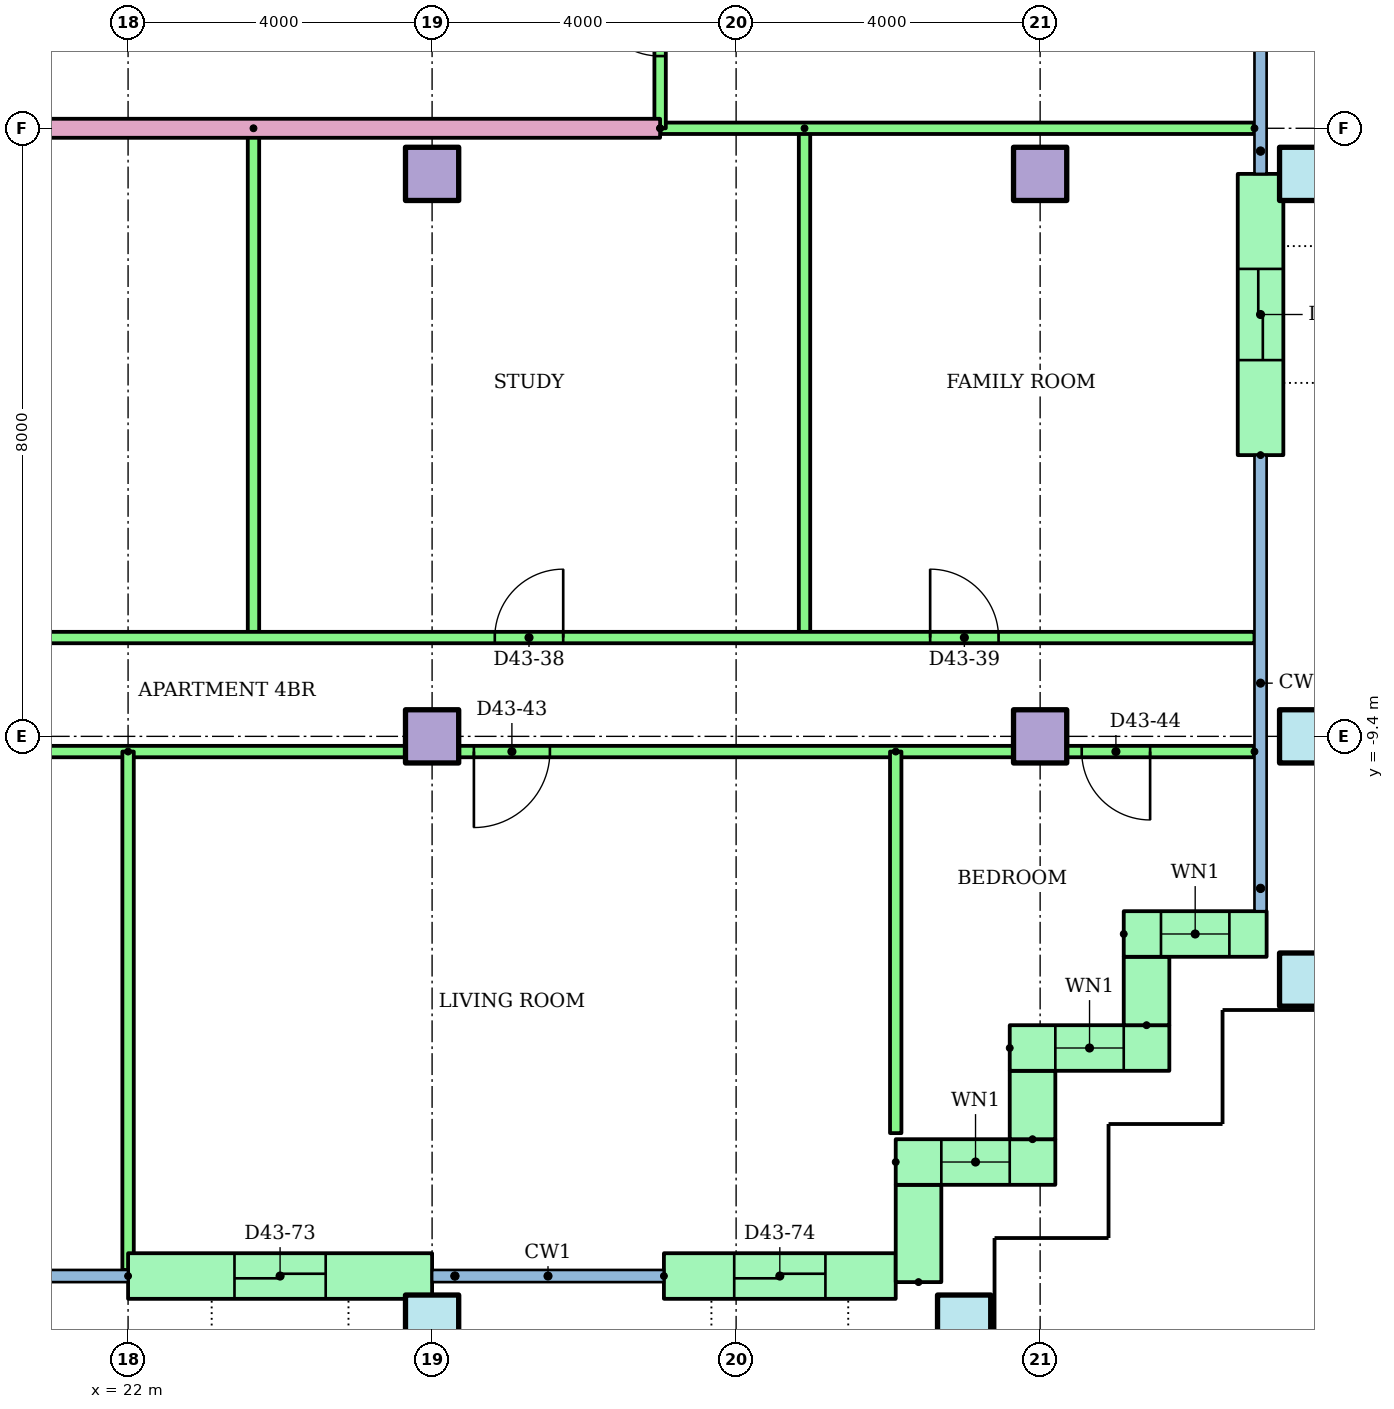
"""IFC4 building model, lengths in metres.
Left out: names, types, materials, properties, quantities, classifications, styles, units other than length and angle.
Written with IfcOpenShell. Run it as: python <this file> out.ifc"""

import sys

from ifc_helpers import new_model, si_unit, direction, frame, frame_2d, origin, origin_2d, place, context, subcontext, project, spatial, rectangle, hollow_rectangle, extrude, element, fill, save


model = new_model("IFC4")
c1 = context("Model", 3, precision=1e-05, world=origin(), true_north=direction((0.0, 1.0)))
c2 = subcontext(c1, "Body", "Model", "MODEL_VIEW")
j1 = project(units=[si_unit("LENGTHUNIT", "METRE"), si_unit("PLANEANGLEUNIT", "RADIAN")], contexts=[c1])
p1 = place(None, origin())
s1 = spatial("IfcSite", under=j1, at=p1, CompositionType="ELEMENT")
p2 = place(p1, origin())
s2 = spatial("IfcBuilding", under=s1, at=p2, CompositionType="ELEMENT")
p3 = place(p2, frame((0.0, 0.0, 168.5)))
s3 = spatial("IfcBuildingStorey", under=s2, at=p3, CompositionType="ELEMENT", Elevation=168.5)
for number, where in (
    (1, (26.0, -17.1, 0.0)),
    (2, (33.0, -17.1, 0.0)),
    (3, (37.5, -12.6, 0.0)),
):
    element("IfcColumn", number, at=place(p3, frame(where)), inside=s3, PredefinedType="COLUMN", context=c2, shape_type="SweptSolid", body=[
        extrude(hollow_rectangle(XDim=0.7, YDim=0.7, WallThickness=0.036, at=origin_2d()), origin(), (0.0, 0.0, 1.0), 3.2),
    ])
for number, where in (
    (4, (26.0, -9.4, 0.0)),
    (5, (34.0, -9.4, 0.0)),
):
    element("IfcColumn", number, at=place(p3, frame(where)), inside=s3, PredefinedType="COLUMN", context=c2, shape_type="SweptSolid", body=[
        extrude(rectangle(XDim=0.7, YDim=0.7, at=origin_2d()), origin(), (0.0, 0.0, 1.0), 3.2),
    ])
p4 = place(p3, frame((37.5, -9.4, 0.0)))
e6 = element("IfcColumn", 6, at=p4, inside=s3, PredefinedType="COLUMN", context=c2, shape_type="SweptSolid", body=[
    extrude(hollow_rectangle(XDim=0.7, YDim=0.7, WallThickness=0.036, at=origin_2d()), origin(), (0.0, 0.0, 1.0), 3.2),
])
for number, where in (
    (7, (26.0, -2.0, 0.0)),
    (8, (34.0, -2.0, 0.0)),
):
    element("IfcColumn", number, at=place(p3, frame(where)), inside=s3, PredefinedType="COLUMN", context=c2, shape_type="SweptSolid", body=[
        extrude(rectangle(XDim=0.7, YDim=0.7, at=origin_2d()), origin(), (0.0, 0.0, 1.0), 3.2),
    ])
p5 = place(p3, frame((37.5, -2.0, 0.0)))
e9 = element("IfcColumn", 9, at=p5, inside=s3, PredefinedType="COLUMN", context=c2, shape_type="SweptSolid", body=[
    extrude(hollow_rectangle(XDim=0.7, YDim=0.7, WallThickness=0.036, at=origin_2d()), origin(), (0.0, 0.0, 1.0), 3.2),
])
p6 = place(p3, frame((22.0, -16.5, 0.0)))
e10 = element("IfcWall", 10, at=p6, inside=s3, PredefinedType="STANDARD", context=c2, shape_type="SweptSolid", body=[
    extrude(rectangle(XDim=4.0, YDim=0.6, at=frame_2d((2.0, 0.0))), origin(), (0.0, 0.0, 1.0), 2.92),
])
p7 = place(p6, frame((1.4, 0.0, 0.0)))
e11 = element("IfcOpeningElement", 11, at=p7, cuts=e10, PredefinedType="OPENING", context=c2, shape_type="SweptSolid", body=[
    extrude(rectangle(XDim=1.2, YDim=2.1, at=frame_2d((0.6, 1.05))), frame((0.0, 0.31, 0.0), z_axis=(0.0, -1.0, 0.0), x_axis=(1.0, 0.0, 0.0)), (0.0, 0.0, 1.0), 0.62),
])
p8 = place(p3, frame((29.05, -16.5, 0.0)))
e12 = element("IfcWall", 12, at=p8, inside=s3, PredefinedType="STANDARD", context=c2, shape_type="SweptSolid", body=[
    extrude(rectangle(XDim=3.05, YDim=0.6, at=frame_2d((1.525, 0.0))), origin(), (0.0, 0.0, 1.0), 2.92),
])
p9 = place(p8, frame((0.925, 0.0, 0.0)))
e13 = element("IfcOpeningElement", 13, at=p9, cuts=e12, PredefinedType="OPENING", context=c2, shape_type="SweptSolid", body=[
    extrude(rectangle(XDim=1.2, YDim=2.1, at=frame_2d((0.6, 1.05))), frame((0.0, 0.31, 0.0), z_axis=(0.0, -1.0, 0.0), x_axis=(1.0, 0.0, 0.0)), (0.0, 0.0, 1.0), 0.62),
])
p10 = place(p3, frame((32.4, -16.58, 0.0), z_axis=(0.0, 0.0, 1.0), x_axis=(0.0, 1.0, 0.0)))
e14 = element("IfcWall", 14, at=p10, inside=s3, PredefinedType="STANDARD", context=c2, shape_type="SweptSolid", body=[
    extrude(rectangle(XDim=1.28, YDim=0.6, at=frame_2d((0.64, 0.0))), origin(), (0.0, 0.0, 1.0), 2.92),
])
p11 = place(p3, frame((32.1, -15.0, 0.0)))
e15 = element("IfcWall", 15, at=p11, inside=s3, PredefinedType="STANDARD", context=c2, shape_type="SweptSolid", body=[
    extrude(rectangle(XDim=2.1, YDim=0.6, at=frame_2d((1.05, 0.0))), origin(), (0.0, 0.0, 1.0), 2.92),
])
p12 = place(p11, frame((0.6, 0.0, 0.9)))
e16 = element("IfcOpeningElement", 16, at=p12, cuts=e15, PredefinedType="OPENING", context=c2, shape_type="SweptSolid", body=[
    extrude(rectangle(XDim=0.9, YDim=1.5, at=frame_2d((0.45, 0.75))), frame((0.0, 0.31, 0.0), z_axis=(0.0, -1.0, 0.0), x_axis=(1.0, 0.0, 0.0)), (0.0, 0.0, 1.0), 0.62),
])
p13 = place(p3, frame((33.9, -14.7, 0.0), z_axis=(0.0, 0.0, 1.0), x_axis=(0.0, 1.0, 0.0)))
e17 = element("IfcWall", 17, at=p13, inside=s3, PredefinedType="STANDARD", context=c2, shape_type="SweptSolid", body=[
    extrude(rectangle(XDim=0.9, YDim=0.6, at=frame_2d((0.45, 0.0))), origin(), (0.0, 0.0, 1.0), 2.92),
])
p14 = place(p3, frame((33.6, -13.5, 0.0)))
e18 = element("IfcWall", 18, at=p14, inside=s3, PredefinedType="STANDARD", context=c2, shape_type="SweptSolid", body=[
    extrude(rectangle(XDim=2.1, YDim=0.6, at=frame_2d((1.05, 0.0))), origin(), (0.0, 0.0, 1.0), 2.92),
])
p15 = place(p14, frame((0.6, 0.0, 0.9)))
e19 = element("IfcOpeningElement", 19, at=p15, cuts=e18, PredefinedType="OPENING", context=c2, shape_type="SweptSolid", body=[
    extrude(rectangle(XDim=0.9, YDim=1.5, at=frame_2d((0.45, 0.75))), frame((0.0, 0.31, 0.0), z_axis=(0.0, -1.0, 0.0), x_axis=(1.0, 0.0, 0.0)), (0.0, 0.0, 1.0), 0.62),
])
p16 = place(p3, frame((35.4, -13.2, 0.0), z_axis=(0.0, 0.0, 1.0), x_axis=(0.0, 1.0, 0.0)))
e20 = element("IfcWall", 20, at=p16, inside=s3, PredefinedType="STANDARD", context=c2, shape_type="SweptSolid", body=[
    extrude(rectangle(XDim=0.9, YDim=0.6, at=frame_2d((0.45, 0.0))), origin(), (0.0, 0.0, 1.0), 2.92),
])
p17 = place(p3, frame((35.1, -12.0, 0.0)))
e21 = element("IfcWall", 21, at=p17, inside=s3, PredefinedType="STANDARD", context=c2, shape_type="SweptSolid", body=[
    extrude(rectangle(XDim=1.88, YDim=0.6, at=frame_2d((0.94, 0.0))), origin(), (0.0, 0.0, 1.0), 2.92),
])
p18 = place(p17, frame((0.49, 0.0, 0.9)))
e22 = element("IfcOpeningElement", 22, at=p18, cuts=e21, PredefinedType="OPENING", context=c2, shape_type="SweptSolid", body=[
    extrude(rectangle(XDim=0.9, YDim=1.5, at=frame_2d((0.45, 0.75))), frame((0.0, 0.31, 0.0), z_axis=(0.0, -1.0, 0.0), x_axis=(1.0, 0.0, 0.0)), (0.0, 0.0, 1.0), 0.62),
])
p19 = place(p3, frame((36.9, -5.7, 0.0), z_axis=(0.0, 0.0, 1.0), x_axis=(0.0, 1.0, 0.0)))
e23 = element("IfcWall", 23, at=p19, inside=s3, PredefinedType="STANDARD", context=c2, shape_type="SweptSolid", body=[
    extrude(rectangle(XDim=3.7, YDim=0.6, at=frame_2d((1.85, 0.0))), origin(), (0.0, 0.0, 1.0), 2.92),
])
p20 = place(p19, frame((1.25, 0.0, 0.0)))
e24 = element("IfcOpeningElement", 24, at=p20, cuts=e23, PredefinedType="OPENING", context=c2, shape_type="SweptSolid", body=[
    extrude(rectangle(XDim=1.2, YDim=2.1, at=frame_2d((0.6, 1.05))), frame((0.0, 0.31, 0.0), z_axis=(0.0, -1.0, 0.0), x_axis=(1.0, 0.0, 0.0)), (0.0, 0.0, 1.0), 0.62),
])
for number, where, z_axis, x_axis in (
    (25, (23.65, -1.4, 0.0), (0.0, 0.0, 1.0), (0.0, -1.0, 0.0)),
    (26, (30.9, -1.4, 0.0), (0.0, 0.0, 1.0), (0.0, -1.0, 0.0)),
):
    element("IfcWall", number, at=place(p3, frame(where, z_axis=z_axis, x_axis=x_axis)), inside=s3, PredefinedType="PARTITIONING", context=c2, shape_type="SweptSolid", body=[
        extrude(rectangle(XDim=6.7, YDim=0.15, at=frame_2d((3.35, 0.0))), origin(), (0.0, 0.0, 1.0), 2.4),
    ])
p21 = place(p3, frame((12.0, -8.1, 0.0)))
e27 = element("IfcWall", 27, at=p21, inside=s3, PredefinedType="PARTITIONING", context=c2, shape_type="SweptSolid", body=[
    extrude(rectangle(XDim=24.82, YDim=0.15, at=frame_2d((12.41, 0.0))), origin(), (0.0, 0.0, 1.0), 2.4),
])
p22 = place(p21, frame((6.575, 0.0, 0.0)))
e28 = element("IfcOpeningElement", 28, at=p22, cuts=e27, PredefinedType="OPENING", context=c2, shape_type="SweptSolid", body=[
    extrude(rectangle(XDim=0.9, YDim=2.1, at=frame_2d((0.45, 1.05))), frame((0.0, 0.085, 0.0), z_axis=(0.0, -1.0, 0.0), x_axis=(1.0, 0.0, 0.0)), (0.0, 0.0, 1.0), 0.17),
])
p23 = place(p21, frame((14.825, 0.0, 0.0)))
e29 = element("IfcOpeningElement", 29, at=p23, cuts=e27, PredefinedType="OPENING", context=c2, shape_type="SweptSolid", body=[
    extrude(rectangle(XDim=0.9, YDim=2.1, at=frame_2d((0.45, 1.05))), frame((0.0, 0.085, 0.0), z_axis=(0.0, -1.0, 0.0), x_axis=(1.0, 0.0, 0.0)), (0.0, 0.0, 1.0), 0.17),
])
p24 = place(p21, frame((20.553, 0.0, 0.0)))
e30 = element("IfcOpeningElement", 30, at=p24, cuts=e27, PredefinedType="OPENING", context=c2, shape_type="SweptSolid", body=[
    extrude(rectangle(XDim=0.9, YDim=2.1, at=frame_2d((0.45, 1.05))), frame((0.0, 0.085, 0.0), z_axis=(0.0, -1.0, 0.0), x_axis=(1.0, 0.0, 0.0)), (0.0, 0.0, 1.0), 0.17),
])
p25 = place(p3, frame((36.82, -9.6, 0.0), z_axis=(0.0, 0.0, 1.0), x_axis=(-1.0, 0.0, 0.0)))
e31 = element("IfcWall", 31, at=p25, inside=s3, PredefinedType="PARTITIONING", context=c2, shape_type="SweptSolid", body=[
    extrude(rectangle(XDim=26.82, YDim=0.15, at=frame_2d((13.41, 0.0))), origin(), (0.0, 0.0, 1.0), 2.4),
])
p26 = place(p25, frame((24.37, 0.0, 0.0)))
e32 = element("IfcOpeningElement", 32, at=p26, cuts=e31, PredefinedType="OPENING", context=c2, shape_type="SweptSolid", body=[
    extrude(rectangle(XDim=0.9, YDim=2.1, at=frame_2d((0.45, 1.05))), frame((0.0, 0.085, 0.0), z_axis=(0.0, -1.0, 0.0), x_axis=(1.0, 0.0, 0.0)), (0.0, 0.0, 1.0), 0.17),
])
p27 = place(p25, frame((20.37, 0.0, 0.0)))
e33 = element("IfcOpeningElement", 33, at=p27, cuts=e31, PredefinedType="OPENING", context=c2, shape_type="SweptSolid", body=[
    extrude(rectangle(XDim=0.9, YDim=2.1, at=frame_2d((0.45, 1.05))), frame((0.0, 0.085, 0.0), z_axis=(0.0, -1.0, 0.0), x_axis=(1.0, 0.0, 0.0)), (0.0, 0.0, 1.0), 0.17),
])
p28 = place(p25, frame((16.37, 0.0, 0.0)))
e34 = element("IfcOpeningElement", 34, at=p28, cuts=e31, PredefinedType="OPENING", context=c2, shape_type="SweptSolid", body=[
    extrude(rectangle(XDim=0.9, YDim=2.1, at=frame_2d((0.45, 1.05))), frame((0.0, 0.085, 0.0), z_axis=(0.0, -1.0, 0.0), x_axis=(1.0, 0.0, 0.0)), (0.0, 0.0, 1.0), 0.17),
])
p29 = place(p25, frame((9.27, 0.0, 0.0)))
e35 = element("IfcOpeningElement", 35, at=p29, cuts=e31, PredefinedType="OPENING", context=c2, shape_type="SweptSolid", body=[
    extrude(rectangle(XDim=1.0, YDim=2.1, at=frame_2d((0.5, 1.05))), frame((0.0, 0.085, 0.0), z_axis=(0.0, -1.0, 0.0), x_axis=(1.0, 0.0, 0.0)), (0.0, 0.0, 1.0), 0.17),
])
p30 = place(p25, frame((1.373, 0.0, 0.0)))
e36 = element("IfcOpeningElement", 36, at=p30, cuts=e31, PredefinedType="OPENING", context=c2, shape_type="SweptSolid", body=[
    extrude(rectangle(XDim=0.9, YDim=2.1, at=frame_2d((0.45, 1.05))), frame((0.0, 0.085, 0.0), z_axis=(0.0, -1.0, 0.0), x_axis=(1.0, 0.0, 0.0)), (0.0, 0.0, 1.0), 0.17),
])
p31 = place(p3, frame((22.0, -9.6, 0.0), z_axis=(0.0, 0.0, 1.0), x_axis=(0.0, -1.0, 0.0)))
e37 = element("IfcWall", 37, at=p31, inside=s3, PredefinedType="PARTITIONING", context=c2, shape_type="SweptSolid", body=[
    extrude(rectangle(XDim=6.821, YDim=0.15, at=frame_2d((3.41, 0.0))), origin(), (0.0, 0.0, 1.0), 2.4),
])
p32 = place(p3, frame((32.1, -9.6, 0.0), z_axis=(0.0, 0.0, 1.0), x_axis=(0.0, -1.0, 0.0)))
e38 = element("IfcWall", 38, at=p32, inside=s3, PredefinedType="PARTITIONING", context=c2, shape_type="SweptSolid", body=[
    extrude(rectangle(XDim=5.02, YDim=0.15, at=frame_2d((2.51, 0.0))), origin(), (0.0, 0.0, 1.0), 2.4),
])
p33 = place(p3, frame((29.0, -1.4, 0.0), z_axis=(0.0, 0.0, 1.0), x_axis=(-1.0, 0.0, 0.0)))
e39 = element("IfcWall", 39, at=p33, inside=s3, PredefinedType="PARTITIONING", context=c2, shape_type="SweptSolid", body=[
    extrude(rectangle(XDim=15.0, YDim=0.25, at=frame_2d((7.5, 0.0))), origin(), (0.0, 0.0, 1.0), 2.4),
])
p34 = place(p3, frame((36.82, -1.4, 0.0), z_axis=(0.0, 0.0, 1.0), x_axis=(-1.0, 0.0, 0.0)))
e40 = element("IfcWall", 40, at=p34, inside=s3, PredefinedType="PARTITIONING", context=c2, shape_type="SweptSolid", body=[
    extrude(rectangle(XDim=7.82, YDim=0.15, at=frame_2d((3.91, 0.0))), origin(), (0.0, 0.0, 1.0), 2.4),
])
p35 = place(p3, frame((29.0, -1.4, 0.0), z_axis=(0.0, 0.0, 1.0), x_axis=(0.0, 1.0, 0.0)))
e41 = element("IfcWall", 41, at=p35, inside=s3, PredefinedType="PARTITIONING", context=c2, shape_type="SweptSolid", body=[
    extrude(rectangle(XDim=2.8, YDim=0.15, at=frame_2d((1.4, 0.0))), origin(), (0.0, 0.0, 1.0), 2.4),
])
p36 = place(p35, frame((0.95, 0.0, 0.0)))
e42 = element("IfcOpeningElement", 42, at=p36, cuts=e41, PredefinedType="OPENING", context=c2, shape_type="SweptSolid", body=[
    extrude(rectangle(XDim=0.9, YDim=2.1, at=frame_2d((0.45, 1.05))), frame((0.0, 0.085, 0.0), z_axis=(0.0, -1.0, 0.0), x_axis=(1.0, 0.0, 0.0)), (0.0, 0.0, 1.0), 0.17),
])
p37 = place(p12, origin())
e43 = element("IfcWindow", 43, at=p37, inside=s3, PartitioningType="SINGLE_PANEL", PredefinedType="WINDOW", context=c2, shape_type="SweptSolid", body=[
    extrude(rectangle(XDim=0.9, YDim=1.5, at=frame_2d((0.45, 0.75))), frame((0.0, 0.03, 0.0), z_axis=(0.0, -1.0, 0.0), x_axis=(1.0, 0.0, 0.0)), (0.0, 0.0, 1.0), 0.06),
])
fill(e16, e43)
p38 = place(p15, origin())
e44 = element("IfcWindow", 44, at=p38, inside=s3, PartitioningType="SINGLE_PANEL", PredefinedType="WINDOW", context=c2, shape_type="SweptSolid", body=[
    extrude(rectangle(XDim=0.9, YDim=1.5, at=frame_2d((0.45, 0.75))), frame((0.0, 0.03, 0.0), z_axis=(0.0, -1.0, 0.0), x_axis=(1.0, 0.0, 0.0)), (0.0, 0.0, 1.0), 0.06),
])
fill(e19, e44)
p39 = place(p18, origin())
e45 = element("IfcWindow", 45, at=p39, inside=s3, PartitioningType="SINGLE_PANEL", PredefinedType="WINDOW", context=c2, shape_type="SweptSolid", body=[
    extrude(rectangle(XDim=0.9, YDim=1.5, at=frame_2d((0.45, 0.75))), frame((0.0, 0.03, 0.0), z_axis=(0.0, -1.0, 0.0), x_axis=(1.0, 0.0, 0.0)), (0.0, 0.0, 1.0), 0.06),
])
fill(e22, e45)
p40 = place(p23, origin())
e46 = element("IfcDoor", 46, at=p40, inside=s3, OperationType="SINGLE_SWING_RIGHT", PredefinedType="DOOR", context=c2, shape_type="SweptSolid", body=[
    extrude(rectangle(XDim=0.9, YDim=2.1, at=frame_2d((0.45, 1.05))), frame((0.0, 0.025, 0.0), z_axis=(0.0, -1.0, 0.0), x_axis=(1.0, 0.0, 0.0)), (0.0, 0.0, 1.0), 0.05),
])
fill(e29, e46)
p41 = place(p24, origin())
e47 = element("IfcDoor", 47, at=p41, inside=s3, OperationType="SINGLE_SWING_LEFT", PredefinedType="DOOR", context=c2, shape_type="SweptSolid", body=[
    extrude(rectangle(XDim=0.9, YDim=2.1, at=frame_2d((0.45, 1.05))), frame((0.0, 0.025, 0.0), z_axis=(0.0, -1.0, 0.0), x_axis=(1.0, 0.0, 0.0)), (0.0, 0.0, 1.0), 0.05),
])
fill(e30, e47)
p42 = place(p29, origin())
e48 = element("IfcDoor", 48, at=p42, inside=s3, OperationType="SINGLE_SWING_RIGHT", PredefinedType="DOOR", context=c2, shape_type="SweptSolid", body=[
    extrude(rectangle(XDim=1.0, YDim=2.1, at=frame_2d((0.5, 1.05))), frame((0.0, 0.025, 0.0), z_axis=(0.0, -1.0, 0.0), x_axis=(1.0, 0.0, 0.0)), (0.0, 0.0, 1.0), 0.05),
])
fill(e35, e48)
p43 = place(p30, origin())
e49 = element("IfcDoor", 49, at=p43, inside=s3, OperationType="SINGLE_SWING_LEFT", PredefinedType="DOOR", context=c2, shape_type="SweptSolid", body=[
    extrude(rectangle(XDim=0.9, YDim=2.1, at=frame_2d((0.45, 1.05))), frame((0.0, 0.025, 0.0), z_axis=(0.0, -1.0, 0.0), x_axis=(1.0, 0.0, 0.0)), (0.0, 0.0, 1.0), 0.05),
])
fill(e36, e49)
p44 = place(p36, origin())
e50 = element("IfcDoor", 50, at=p44, inside=s3, OperationType="SINGLE_SWING_RIGHT", PredefinedType="DOOR", context=c2, shape_type="SweptSolid", body=[
    extrude(rectangle(XDim=0.9, YDim=2.1, at=frame_2d((0.45, 1.05))), frame((0.0, 0.025, 0.0), z_axis=(0.0, -1.0, 0.0), x_axis=(1.0, 0.0, 0.0)), (0.0, 0.0, 1.0), 0.05),
])
fill(e42, e50)
p45 = place(p7, origin())
e51 = element("IfcDoor", 51, at=p45, inside=s3, OperationType="SLIDING_TO_LEFT", PredefinedType="DOOR", context=c2, shape_type="SweptSolid", body=[
    extrude(rectangle(XDim=1.2, YDim=2.1, at=frame_2d((0.6, 1.05))), frame((0.0, 0.025, 0.0), z_axis=(0.0, -1.0, 0.0), x_axis=(1.0, 0.0, 0.0)), (0.0, 0.0, 1.0), 0.05),
])
fill(e11, e51)
p46 = place(p9, origin())
e52 = element("IfcDoor", 52, at=p46, inside=s3, OperationType="SLIDING_TO_LEFT", PredefinedType="DOOR", context=c2, shape_type="SweptSolid", body=[
    extrude(rectangle(XDim=1.2, YDim=2.1, at=frame_2d((0.6, 1.05))), frame((0.0, 0.025, 0.0), z_axis=(0.0, -1.0, 0.0), x_axis=(1.0, 0.0, 0.0)), (0.0, 0.0, 1.0), 0.05),
])
fill(e13, e52)
p47 = place(p20, origin())
e53 = element("IfcDoor", 53, at=p47, inside=s3, OperationType="SLIDING_TO_LEFT", PredefinedType="DOOR", context=c2, shape_type="SweptSolid", body=[
    extrude(rectangle(XDim=1.2, YDim=2.1, at=frame_2d((0.6, 1.05))), frame((0.0, 0.025, 0.0), z_axis=(0.0, -1.0, 0.0), x_axis=(1.0, 0.0, 0.0)), (0.0, 0.0, 1.0), 0.05),
])
fill(e24, e53)
save(model, sys.argv[1])
